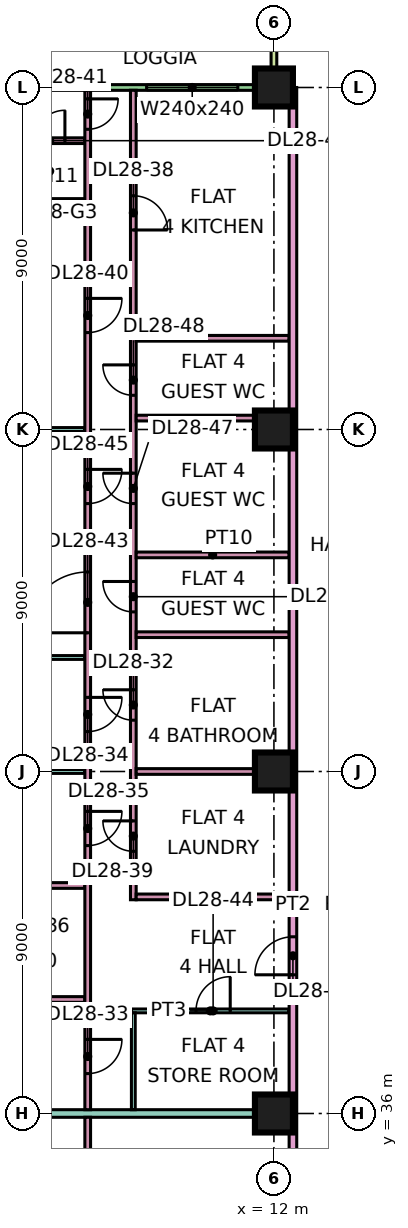
"""IFC4 building model, lengths in metres.
Left out: names, types, materials, properties, quantities, classifications, styles, units other than length and angle.
Written with IfcOpenShell. Run it as: python <this file> out.ifc"""

import sys

from ifc_helpers import new_model, si_unit, direction, frame, frame_2d, origin, origin_2d, place, context, subcontext, project, spatial, rectangle, extrude, element, fill, save


model = new_model("IFC4")
c1 = context("Model", 3, precision=1e-05, world=origin(), true_north=direction((0.0, 1.0)))
c2 = subcontext(c1, "Body", "Model", "MODEL_VIEW")
j1 = project(units=[si_unit("LENGTHUNIT", "METRE"), si_unit("PLANEANGLEUNIT", "RADIAN")], contexts=[c1])
p1 = place(None, origin())
s1 = spatial("IfcSite", under=j1, at=p1, CompositionType="ELEMENT")
p2 = place(p1, origin())
s2 = spatial("IfcBuilding", under=s1, at=p2, CompositionType="ELEMENT")
p3 = place(p2, frame((0.0, 0.0, 121.9)))
s3 = spatial("IfcBuildingStorey", under=s2, at=p3, CompositionType="ELEMENT", Elevation=121.9)
for number, where, z_axis, x_axis in (
    (1, (12.0, 36.0, 0.0), (0.0, 0.0, 1.0), (1.0, 0.0, 0.0)),
    (2, (12.0, 45.0, 0.0), (0.0, 0.0, 1.0), (1.0, 0.0, 0.0)),
    (3, (12.0, 54.0, 0.0), (0.0, 0.0, 1.0), (1.0, 0.0, 0.0)),
    (4, (12.0, 63.0, 0.0), (0.0, 0.0, 1.0), (1.0, 0.0, 0.0)),
):
    element("IfcColumn", number, at=place(p3, frame(where, z_axis=z_axis, x_axis=x_axis)), inside=s3, PredefinedType="COLUMN", context=c2, shape_type="SweptSolid", body=[
        extrude(rectangle(XDim=1.0, YDim=1.0, at=origin_2d()), origin(), (0.0, 0.0, 1.0), 3.75),
    ])
p4 = place(p3, frame((11.925, 63.0, 0.0), z_axis=(0.0, 0.0, 1.0), x_axis=(-1.0, 0.0, 0.0)))
e5 = element("IfcWall", 5, at=p4, inside=s3, PredefinedType="SOLIDWALL", context=c2, shape_type="SweptSolid", body=[
    extrude(rectangle(XDim=10.35, YDim=0.15, at=frame_2d((5.175, 0.0))), origin(), (0.0, 0.0, 1.0), 3.35),
])
p5 = place(p4, frame((0.875, 0.0, 0.45)))
e6 = element("IfcOpeningElement", 6, at=p5, cuts=e5, PredefinedType="OPENING", context=c2, shape_type="SweptSolid", body=[
    extrude(rectangle(XDim=2.4, YDim=2.4, at=frame_2d((1.2, 1.2))), frame((0.0, 0.085, 0.0), z_axis=(0.0, -1.0, 0.0), x_axis=(1.0, 0.0, 0.0)), (0.0, 0.0, 1.0), 0.17),
])
p6 = place(p4, frame((6.688, 0.0, 0.0)))
e7 = element("IfcOpeningElement", 7, at=p6, cuts=e5, PredefinedType="OPENING", context=c2, shape_type="SweptSolid", body=[
    extrude(rectangle(XDim=1.8, YDim=2.4, at=frame_2d((0.9, 1.2))), frame((0.0, 0.085, 0.0), z_axis=(0.0, -1.0, 0.0), x_axis=(1.0, 0.0, 0.0)), (0.0, 0.0, 1.0), 0.17),
])
p7 = place(p3, frame((12.0, 64.5, 0.0), z_axis=(0.0, 0.0, 1.0), x_axis=(0.0, -1.0, 0.0)))
e8 = element("IfcWall", 8, at=p7, inside=s3, PredefinedType="SOLIDWALL", context=c2, shape_type="SweptSolid", body=[
    extrude(rectangle(XDim=1.5, YDim=0.15, at=frame_2d((0.75, 0.0))), origin(), (0.0, 0.0, 1.0), 3.35),
])
p8 = place(p3, frame((-1.351, 39.0, 0.0), z_axis=(0.0, 0.0, 1.0), x_axis=(1.0, 0.0, 0.0)))
e9 = element("IfcWall", 9, at=p8, inside=s3, PredefinedType="PARTITIONING", context=c2, shape_type="SweptSolid", body=[
    extrude(rectangle(XDim=8.376, YDim=0.15, at=frame_2d((4.188, 0.0))), origin(), (0.0, 0.0, 1.0), 3.35),
])
p9 = place(p3, frame((-1.351, 45.0, 0.0), z_axis=(0.0, 0.0, 1.0), x_axis=(1.0, 0.0, 0.0)))
e10 = element("IfcWall", 10, at=p9, inside=s3, PredefinedType="PARTITIONING", context=c2, shape_type="SweptSolid", body=[
    extrude(rectangle(XDim=8.376, YDim=0.1, at=frame_2d((4.188, 0.0))), origin(), (0.0, 0.0, 1.0), 3.35),
])
p10 = place(p3, frame((0.0, 36.0, 0.0), z_axis=(0.0, 0.0, 1.0), x_axis=(1.0, 0.0, 0.0)))
e11 = element("IfcWall", 11, at=p10, inside=s3, PredefinedType="PARTITIONING", context=c2, shape_type="SweptSolid", body=[
    extrude(rectangle(XDim=12.4, YDim=0.2, at=frame_2d((6.2, 0.0))), origin(), (0.0, 0.0, 1.0), 3.35),
])
p11 = place(p3, frame((0.0, 48.0, 0.0), z_axis=(0.0, 0.0, 1.0), x_axis=(1.0, 0.0, 0.0)))
e12 = element("IfcWall", 12, at=p11, inside=s3, PredefinedType="PARTITIONING", context=c2, shape_type="SweptSolid", body=[
    extrude(rectangle(XDim=7.025, YDim=0.1, at=frame_2d((3.512, 0.0))), origin(), (0.0, 0.0, 1.0), 3.35),
])
for number, where, z_axis, x_axis in (
    (13, (0.074, 51.0, 0.0), (0.0, 0.0, 1.0), (1.0, 0.0, 0.0)),
    (14, (0.074, 54.0, 0.0), (0.0, 0.0, 1.0), (1.0, 0.0, 0.0)),
):
    element("IfcWall", number, at=place(p3, frame(where, z_axis=z_axis, x_axis=x_axis)), inside=s3, PredefinedType="PARTITIONING", context=c2, shape_type="SweptSolid", body=[
        extrude(rectangle(XDim=6.951, YDim=0.1, at=frame_2d((3.476, 0.0))), origin(), (0.0, 0.0, 1.0), 3.35),
    ])
p12 = place(p3, frame((0.074, 60.0, 0.0), z_axis=(0.0, 0.0, 1.0), x_axis=(1.0, 0.0, 0.0)))
e15 = element("IfcWall", 15, at=p12, inside=s3, PredefinedType="PARTITIONING", context=c2, shape_type="SweptSolid", body=[
    extrude(rectangle(XDim=6.951, YDim=0.15, at=frame_2d((3.476, 0.0))), origin(), (0.0, 0.0, 1.0), 3.35),
])
p13 = place(p3, frame((4.175, 42.0, 0.0), z_axis=(0.0, 0.0, 1.0), x_axis=(1.0, 0.0, 0.0)))
e16 = element("IfcWall", 16, at=p13, inside=s3, PredefinedType="PARTITIONING", context=c2, shape_type="SweptSolid", body=[
    extrude(rectangle(XDim=2.85, YDim=0.15, at=frame_2d((1.425, 0.0))), origin(), (0.0, 0.0, 1.0), 3.35),
])
p14 = place(p13, frame((0.975, 0.0, 0.0)))
e17 = element("IfcOpeningElement", 17, at=p14, cuts=e16, PredefinedType="OPENING", context=c2, shape_type="SweptSolid", body=[
    extrude(rectangle(XDim=0.8, YDim=2.1, at=frame_2d((0.4, 1.05))), frame((0.0, 0.085, 0.0), z_axis=(0.0, -1.0, 0.0), x_axis=(1.0, 0.0, 0.0)), (0.0, 0.0, 1.0), 0.17),
])
p15 = place(p3, frame((5.025, 61.6, 0.0), z_axis=(0.0, 0.0, 1.0), x_axis=(1.0, 0.0, 0.0)))
e18 = element("IfcWall", 18, at=p15, inside=s3, PredefinedType="PARTITIONING", context=c2, shape_type="SweptSolid", body=[
    extrude(rectangle(XDim=2.0, YDim=0.15, at=frame_2d((1.0, 0.0))), origin(), (0.0, 0.0, 1.0), 3.35),
])
p16 = place(p15, frame((0.675, 0.0, 0.0)))
e19 = element("IfcOpeningElement", 19, at=p16, cuts=e18, PredefinedType="OPENING", context=c2, shape_type="SweptSolid", body=[
    extrude(rectangle(XDim=0.8, YDim=2.1, at=frame_2d((0.4, 1.05))), frame((0.0, 0.085, 0.0), z_axis=(0.0, -1.0, 0.0), x_axis=(1.0, 0.0, 0.0)), (0.0, 0.0, 1.0), 0.17),
])
p17 = place(p3, frame((7.1, 27.525, 0.0), z_axis=(0.0, 0.0, 1.0), x_axis=(0.0, 1.0, 0.0)))
e20 = element("IfcWall", 20, at=p17, inside=s3, PredefinedType="PARTITIONING", context=c2, shape_type="SweptSolid", body=[
    extrude(rectangle(XDim=8.375, YDim=0.15, at=frame_2d((4.188, 0.0))), origin(), (0.0, 0.0, 1.0), 3.35),
])
p18 = place(p17, frame((0.675, 0.0, 0.0)))
e21 = element("IfcOpeningElement", 21, at=p18, cuts=e20, PredefinedType="OPENING", context=c2, shape_type="SweptSolid", body=[
    extrude(rectangle(XDim=0.8, YDim=2.1, at=frame_2d((0.4, 1.05))), frame((0.0, 0.085, 0.0), z_axis=(0.0, -1.0, 0.0), x_axis=(1.0, 0.0, 0.0)), (0.0, 0.0, 1.0), 0.17),
])
p19 = place(p17, frame((4.875, 0.0, 0.0)))
e22 = element("IfcOpeningElement", 22, at=p19, cuts=e20, PredefinedType="OPENING", context=c2, shape_type="SweptSolid", body=[
    extrude(rectangle(XDim=0.9, YDim=2.1, at=frame_2d((0.45, 1.05))), frame((0.0, 0.085, 0.0), z_axis=(0.0, -1.0, 0.0), x_axis=(1.0, 0.0, 0.0)), (0.0, 0.0, 1.0), 0.17),
])
p20 = place(p3, frame((7.1, 36.1, 0.0), z_axis=(0.0, 0.0, 1.0), x_axis=(0.0, 1.0, 0.0)))
e23 = element("IfcWall", 23, at=p20, inside=s3, PredefinedType="PARTITIONING", context=c2, shape_type="SweptSolid", body=[
    extrude(rectangle(XDim=26.826, YDim=0.15, at=frame_2d((13.413, 0.0))), origin(), (0.0, 0.0, 1.0), 3.35),
])
p21 = place(p20, frame((0.95, 0.0, 0.0)))
e24 = element("IfcOpeningElement", 24, at=p21, cuts=e23, PredefinedType="OPENING", context=c2, shape_type="SweptSolid", body=[
    extrude(rectangle(XDim=0.9, YDim=2.1, at=frame_2d((0.45, 1.05))), frame((0.0, 0.085, 0.0), z_axis=(0.0, -1.0, 0.0), x_axis=(1.0, 0.0, 0.0)), (0.0, 0.0, 1.0), 0.17),
])
p22 = place(p20, frame((9.95, 0.0, 0.0)))
e25 = element("IfcOpeningElement", 25, at=p22, cuts=e23, PredefinedType="OPENING", context=c2, shape_type="SweptSolid", body=[
    extrude(rectangle(XDim=0.9, YDim=2.1, at=frame_2d((0.45, 1.05))), frame((0.0, 0.085, 0.0), z_axis=(0.0, -1.0, 0.0), x_axis=(1.0, 0.0, 0.0)), (0.0, 0.0, 1.0), 0.17),
])
p23 = place(p20, frame((6.95, 0.0, 0.0)))
e26 = element("IfcOpeningElement", 26, at=p23, cuts=e23, PredefinedType="OPENING", context=c2, shape_type="SweptSolid", body=[
    extrude(rectangle(XDim=0.9, YDim=2.1, at=frame_2d((0.45, 1.05))), frame((0.0, 0.085, 0.0), z_axis=(0.0, -1.0, 0.0), x_axis=(1.0, 0.0, 0.0)), (0.0, 0.0, 1.0), 0.17),
])
p24 = place(p20, frame((20.45, 0.0, 0.0)))
e27 = element("IfcOpeningElement", 27, at=p24, cuts=e23, PredefinedType="OPENING", context=c2, shape_type="SweptSolid", body=[
    extrude(rectangle(XDim=0.9, YDim=2.1, at=frame_2d((0.45, 1.05))), frame((0.0, 0.085, 0.0), z_axis=(0.0, -1.0, 0.0), x_axis=(1.0, 0.0, 0.0)), (0.0, 0.0, 1.0), 0.17),
])
p25 = place(p20, frame((25.8, 0.0, 0.0)))
e28 = element("IfcOpeningElement", 28, at=p25, cuts=e23, PredefinedType="OPENING", context=c2, shape_type="SweptSolid", body=[
    extrude(rectangle(XDim=0.8, YDim=2.1, at=frame_2d((0.4, 1.05))), frame((0.0, 0.085, 0.0), z_axis=(0.0, -1.0, 0.0), x_axis=(1.0, 0.0, 0.0)), (0.0, 0.0, 1.0), 0.17),
])
p26 = place(p20, frame((12.55, 0.0, 0.0)))
e29 = element("IfcOpeningElement", 29, at=p26, cuts=e23, PredefinedType="OPENING", context=c2, shape_type="SweptSolid", body=[
    extrude(rectangle(XDim=1.6, YDim=2.1, at=frame_2d((0.8, 1.05))), frame((0.0, 0.085, 0.0), z_axis=(0.0, -1.0, 0.0), x_axis=(1.0, 0.0, 0.0)), (0.0, 0.0, 1.0), 0.17),
])
p27 = place(p20, frame((15.95, 0.0, 0.0)))
e30 = element("IfcOpeningElement", 30, at=p27, cuts=e23, PredefinedType="OPENING", context=c2, shape_type="SweptSolid", body=[
    extrude(rectangle(XDim=0.9, YDim=2.1, at=frame_2d((0.45, 1.05))), frame((0.0, 0.085, 0.0), z_axis=(0.0, -1.0, 0.0), x_axis=(1.0, 0.0, 0.0)), (0.0, 0.0, 1.0), 0.17),
])
p28 = place(p3, frame((8.25, 38.7, 0.0), z_axis=(0.0, 0.0, 1.0), x_axis=(1.0, 0.0, 0.0)))
e31 = element("IfcWall", 31, at=p28, inside=s3, PredefinedType="PARTITIONING", context=c2, shape_type="SweptSolid", body=[
    extrude(rectangle(XDim=4.15, YDim=0.1, at=frame_2d((2.075, 0.0))), origin(), (0.0, 0.0, 1.0), 3.35),
])
p29 = place(p28, frame((1.7, 0.0, 0.0)))
e32 = element("IfcOpeningElement", 32, at=p29, cuts=e31, PredefinedType="OPENING", context=c2, shape_type="SweptSolid", body=[
    extrude(rectangle(XDim=0.9, YDim=2.1, at=frame_2d((0.45, 1.05))), frame((0.0, 0.06, 0.0), z_axis=(0.0, -1.0, 0.0), x_axis=(1.0, 0.0, 0.0)), (0.0, 0.0, 1.0), 0.12),
])
p30 = place(p3, frame((8.3, 36.1, 0.0), z_axis=(0.0, 0.0, 1.0), x_axis=(0.0, 1.0, 0.0)))
e33 = element("IfcWall", 33, at=p30, inside=s3, PredefinedType="PARTITIONING", context=c2, shape_type="SweptSolid", body=[
    extrude(rectangle(XDim=2.55, YDim=0.1, at=frame_2d((1.275, 0.0))), origin(), (0.0, 0.0, 1.0), 3.35),
])
p31 = place(p3, frame((8.3, 41.625, 0.0), z_axis=(0.0, 0.0, 1.0), x_axis=(0.0, 1.0, 0.0)))
e34 = element("IfcWall", 34, at=p31, inside=s3, PredefinedType="PARTITIONING", context=c2, shape_type="SweptSolid", body=[
    extrude(rectangle(XDim=21.301, YDim=0.15, at=frame_2d((10.65, 0.0))), origin(), (0.0, 0.0, 1.0), 3.35),
])
p32 = place(p31, frame((4.725, 0.0, 0.0)))
e35 = element("IfcOpeningElement", 35, at=p32, cuts=e34, PredefinedType="OPENING", context=c2, shape_type="SweptSolid", body=[
    extrude(rectangle(XDim=0.8, YDim=2.1, at=frame_2d((0.4, 1.05))), frame((0.0, 0.085, 0.0), z_axis=(0.0, -1.0, 0.0), x_axis=(1.0, 0.0, 0.0)), (0.0, 0.0, 1.0), 0.17),
])
p33 = place(p31, frame((17.625, 0.0, 0.0)))
e36 = element("IfcOpeningElement", 36, at=p33, cuts=e34, PredefinedType="OPENING", context=c2, shape_type="SweptSolid", body=[
    extrude(rectangle(XDim=0.9, YDim=2.1, at=frame_2d((0.45, 1.05))), frame((0.0, 0.085, 0.0), z_axis=(0.0, -1.0, 0.0), x_axis=(1.0, 0.0, 0.0)), (0.0, 0.0, 1.0), 0.17),
])
p34 = place(p31, frame((1.275, 0.0, 0.0)))
e37 = element("IfcOpeningElement", 37, at=p34, cuts=e34, PredefinedType="OPENING", context=c2, shape_type="SweptSolid", body=[
    extrude(rectangle(XDim=0.8, YDim=2.1, at=frame_2d((0.4, 1.05))), frame((0.0, 0.085, 0.0), z_axis=(0.0, -1.0, 0.0), x_axis=(1.0, 0.0, 0.0)), (0.0, 0.0, 1.0), 0.17),
])
p35 = place(p31, frame((7.575, 0.0, 0.0)))
e38 = element("IfcOpeningElement", 38, at=p35, cuts=e34, PredefinedType="OPENING", context=c2, shape_type="SweptSolid", body=[
    extrude(rectangle(XDim=0.8, YDim=2.1, at=frame_2d((0.4, 1.05))), frame((0.0, 0.085, 0.0), z_axis=(0.0, -1.0, 0.0), x_axis=(1.0, 0.0, 0.0)), (0.0, 0.0, 1.0), 0.17),
])
p36 = place(p31, frame((10.425, 0.0, 0.0)))
e39 = element("IfcOpeningElement", 39, at=p36, cuts=e34, PredefinedType="OPENING", context=c2, shape_type="SweptSolid", body=[
    extrude(rectangle(XDim=0.8, YDim=2.1, at=frame_2d((0.4, 1.05))), frame((0.0, 0.085, 0.0), z_axis=(0.0, -1.0, 0.0), x_axis=(1.0, 0.0, 0.0)), (0.0, 0.0, 1.0), 0.17),
])
p37 = place(p31, frame((13.275, 0.0, 0.0)))
e40 = element("IfcOpeningElement", 40, at=p37, cuts=e34, PredefinedType="OPENING", context=c2, shape_type="SweptSolid", body=[
    extrude(rectangle(XDim=0.8, YDim=2.1, at=frame_2d((0.4, 1.05))), frame((0.0, 0.085, 0.0), z_axis=(0.0, -1.0, 0.0), x_axis=(1.0, 0.0, 0.0)), (0.0, 0.0, 1.0), 0.17),
])
for number, where, z_axis, x_axis in (
    (41, (8.375, 41.7, 0.0), (0.0, 0.0, 1.0), (1.0, 0.0, 0.0)),
    (42, (8.375, 45.0, 0.0), (0.0, 0.0, 1.0), (1.0, 0.0, 0.0)),
    (43, (8.375, 48.6, 0.0), (0.0, 0.0, 1.0), (1.0, 0.0, 0.0)),
    (44, (8.375, 50.7, 0.0), (0.0, 0.0, 1.0), (1.0, 0.0, 0.0)),
    (45, (8.375, 54.3, 0.0), (0.0, 0.0, 1.0), (1.0, 0.0, 0.0)),
    (46, (8.375, 56.4, 0.0), (0.0, 0.0, 1.0), (1.0, 0.0, 0.0)),
):
    element("IfcWall", number, at=place(p3, frame(where, z_axis=z_axis, x_axis=x_axis)), inside=s3, PredefinedType="PARTITIONING", context=c2, shape_type="SweptSolid", body=[
        extrude(rectangle(XDim=4.025, YDim=0.15, at=frame_2d((2.012, 0.0))), origin(), (0.0, 0.0, 1.0), 3.35),
    ])
p38 = place(p3, frame((12.5, 20.0, 0.0), z_axis=(0.0, 0.0, 1.0), x_axis=(0.0, 1.0, 0.0)))
e47 = element("IfcWall", 47, at=p38, inside=s3, PredefinedType="PARTITIONING", context=c2, shape_type="SweptSolid", body=[
    extrude(rectangle(XDim=43.0, YDim=0.2, at=frame_2d((21.5, 0.0))), origin(), (0.0, 0.0, 1.0), 3.35),
])
p39 = place(p38, frame((19.65, 0.0, 0.0)))
e48 = element("IfcOpeningElement", 48, at=p39, cuts=e47, PredefinedType="OPENING", context=c2, shape_type="SweptSolid", body=[
    extrude(rectangle(XDim=1.0, YDim=2.1, at=frame_2d((0.5, 1.05))), frame((0.0, 0.11, 0.0), z_axis=(0.0, -1.0, 0.0), x_axis=(1.0, 0.0, 0.0)), (0.0, 0.0, 1.0), 0.22),
])
p40 = place(p38, frame((0.6, 0.0, 0.0)))
e49 = element("IfcOpeningElement", 49, at=p40, cuts=e47, PredefinedType="OPENING", context=c2, shape_type="SweptSolid", body=[
    extrude(rectangle(XDim=1.2, YDim=2.1, at=frame_2d((0.6, 1.05))), frame((0.0, 0.11, 0.0), z_axis=(0.0, -1.0, 0.0), x_axis=(1.0, 0.0, 0.0)), (0.0, 0.0, 1.0), 0.22),
])
p41 = place(p38, frame((4.5, 0.0, 0.0)))
e50 = element("IfcOpeningElement", 50, at=p41, cuts=e47, PredefinedType="OPENING", context=c2, shape_type="SweptSolid", body=[
    extrude(rectangle(XDim=1.0, YDim=2.1, at=frame_2d((0.5, 1.05))), frame((0.0, 0.11, 0.0), z_axis=(0.0, -1.0, 0.0), x_axis=(1.0, 0.0, 0.0)), (0.0, 0.0, 1.0), 0.22),
])
p42 = place(p5, origin())
e51 = element("IfcWindow", 51, at=p42, inside=s3, PartitioningType="SINGLE_PANEL", PredefinedType="WINDOW", context=c2, shape_type="SweptSolid", body=[
    extrude(rectangle(XDim=2.4, YDim=2.4, at=frame_2d((1.2, 1.2))), frame((0.0, 0.03, 0.0), z_axis=(0.0, -1.0, 0.0), x_axis=(1.0, 0.0, 0.0)), (0.0, 0.0, 1.0), 0.06),
])
fill(e6, e51)
p43 = place(p32, frame((0.8, 0.0, 0.0), z_axis=(0.0, 0.0, 1.0), x_axis=(-1.0, 0.0, 0.0)))
e52 = element("IfcDoor", 52, at=p43, inside=s3, OperationType="SINGLE_SWING_RIGHT", PredefinedType="DOOR", context=c2, shape_type="SweptSolid", body=[
    extrude(rectangle(XDim=0.8, YDim=2.1, at=frame_2d((0.4, 1.05))), frame((0.0, 0.025, 0.0), z_axis=(0.0, -1.0, 0.0), x_axis=(1.0, 0.0, 0.0)), (0.0, 0.0, 1.0), 0.05),
])
fill(e35, e52)
p44 = place(p21, origin())
e53 = element("IfcDoor", 53, at=p44, inside=s3, OperationType="SINGLE_SWING_RIGHT", PredefinedType="DOOR", context=c2, shape_type="SweptSolid", body=[
    extrude(rectangle(XDim=0.9, YDim=2.1, at=frame_2d((0.45, 1.05))), frame((0.0, 0.025, 0.0), z_axis=(0.0, -1.0, 0.0), x_axis=(1.0, 0.0, 0.0)), (0.0, 0.0, 1.0), 0.05),
])
fill(e24, e53)
p45 = place(p22, origin())
e54 = element("IfcDoor", 54, at=p45, inside=s3, OperationType="SINGLE_SWING_RIGHT", PredefinedType="DOOR", context=c2, shape_type="SweptSolid", body=[
    extrude(rectangle(XDim=0.9, YDim=2.1, at=frame_2d((0.45, 1.05))), frame((0.0, 0.025, 0.0), z_axis=(0.0, -1.0, 0.0), x_axis=(1.0, 0.0, 0.0)), (0.0, 0.0, 1.0), 0.05),
])
fill(e25, e54)
p46 = place(p23, origin())
e55 = element("IfcDoor", 55, at=p46, inside=s3, OperationType="SINGLE_SWING_RIGHT", PredefinedType="DOOR", context=c2, shape_type="SweptSolid", body=[
    extrude(rectangle(XDim=0.9, YDim=2.1, at=frame_2d((0.45, 1.05))), frame((0.0, 0.025, 0.0), z_axis=(0.0, -1.0, 0.0), x_axis=(1.0, 0.0, 0.0)), (0.0, 0.0, 1.0), 0.05),
])
fill(e26, e55)
p47 = place(p39, origin())
e56 = element("IfcDoor", 56, at=p47, inside=s3, OperationType="SINGLE_SWING_LEFT", PredefinedType="DOOR", context=c2, shape_type="SweptSolid", body=[
    extrude(rectangle(XDim=1.0, YDim=2.1, at=frame_2d((0.5, 1.05))), frame((0.0, 0.025, 0.0), z_axis=(0.0, -1.0, 0.0), x_axis=(1.0, 0.0, 0.0)), (0.0, 0.0, 1.0), 0.05),
])
fill(e48, e56)
p48 = place(p33, frame((0.9, 0.0, 0.0), z_axis=(0.0, 0.0, 1.0), x_axis=(-1.0, 0.0, 0.0)))
e57 = element("IfcDoor", 57, at=p48, inside=s3, OperationType="SINGLE_SWING_LEFT", PredefinedType="DOOR", context=c2, shape_type="SweptSolid", body=[
    extrude(rectangle(XDim=0.9, YDim=2.1, at=frame_2d((0.45, 1.05))), frame((0.0, 0.025, 0.0), z_axis=(0.0, -1.0, 0.0), x_axis=(1.0, 0.0, 0.0)), (0.0, 0.0, 1.0), 0.05),
])
fill(e36, e57)
p49 = place(p34, frame((0.8, 0.0, 0.0), z_axis=(0.0, 0.0, 1.0), x_axis=(-1.0, 0.0, 0.0)))
e58 = element("IfcDoor", 58, at=p49, inside=s3, OperationType="SINGLE_SWING_RIGHT", PredefinedType="DOOR", context=c2, shape_type="SweptSolid", body=[
    extrude(rectangle(XDim=0.8, YDim=2.1, at=frame_2d((0.4, 1.05))), frame((0.0, 0.025, 0.0), z_axis=(0.0, -1.0, 0.0), x_axis=(1.0, 0.0, 0.0)), (0.0, 0.0, 1.0), 0.05),
])
fill(e37, e58)
p50 = place(p24, origin())
e59 = element("IfcDoor", 59, at=p50, inside=s3, OperationType="SINGLE_SWING_RIGHT", PredefinedType="DOOR", context=c2, shape_type="SweptSolid", body=[
    extrude(rectangle(XDim=0.9, YDim=2.1, at=frame_2d((0.45, 1.05))), frame((0.0, 0.025, 0.0), z_axis=(0.0, -1.0, 0.0), x_axis=(1.0, 0.0, 0.0)), (0.0, 0.0, 1.0), 0.05),
])
fill(e27, e59)
p51 = place(p25, origin())
e60 = element("IfcDoor", 60, at=p51, inside=s3, OperationType="SINGLE_SWING_RIGHT", PredefinedType="DOOR", context=c2, shape_type="SweptSolid", body=[
    extrude(rectangle(XDim=0.8, YDim=2.1, at=frame_2d((0.4, 1.05))), frame((0.0, 0.025, 0.0), z_axis=(0.0, -1.0, 0.0), x_axis=(1.0, 0.0, 0.0)), (0.0, 0.0, 1.0), 0.05),
])
fill(e28, e60)
p52 = place(p16, frame((0.8, 0.0, 0.0), z_axis=(0.0, 0.0, 1.0), x_axis=(-1.0, 0.0, 0.0)))
e61 = element("IfcDoor", 61, at=p52, inside=s3, OperationType="SINGLE_SWING_RIGHT", PredefinedType="DOOR", context=c2, shape_type="SweptSolid", body=[
    extrude(rectangle(XDim=0.8, YDim=2.1, at=frame_2d((0.4, 1.05))), frame((0.0, 0.025, 0.0), z_axis=(0.0, -1.0, 0.0), x_axis=(1.0, 0.0, 0.0)), (0.0, 0.0, 1.0), 0.05),
])
fill(e19, e61)
p53 = place(p26, origin())
e62 = element("IfcDoor", 62, at=p53, inside=s3, OperationType="DOUBLE_DOOR_SINGLE_SWING", PredefinedType="DOOR", context=c2, shape_type="SweptSolid", body=[
    extrude(rectangle(XDim=1.6, YDim=2.1, at=frame_2d((0.8, 1.05))), frame((0.0, 0.025, 0.0), z_axis=(0.0, -1.0, 0.0), x_axis=(1.0, 0.0, 0.0)), (0.0, 0.0, 1.0), 0.05),
])
fill(e29, e62)
p54 = place(p29, frame((0.9, 0.0, 0.0), z_axis=(0.0, 0.0, 1.0), x_axis=(-1.0, 0.0, 0.0)))
e63 = element("IfcDoor", 63, at=p54, inside=s3, OperationType="SINGLE_SWING_RIGHT", PredefinedType="DOOR", context=c2, shape_type="SweptSolid", body=[
    extrude(rectangle(XDim=0.9, YDim=2.1, at=frame_2d((0.45, 1.05))), frame((0.0, 0.025, 0.0), z_axis=(0.0, -1.0, 0.0), x_axis=(1.0, 0.0, 0.0)), (0.0, 0.0, 1.0), 0.05),
])
fill(e32, e63)
p55 = place(p27, origin())
e64 = element("IfcDoor", 64, at=p55, inside=s3, OperationType="SINGLE_SWING_RIGHT", PredefinedType="DOOR", context=c2, shape_type="SweptSolid", body=[
    extrude(rectangle(XDim=0.9, YDim=2.1, at=frame_2d((0.45, 1.05))), frame((0.0, 0.025, 0.0), z_axis=(0.0, -1.0, 0.0), x_axis=(1.0, 0.0, 0.0)), (0.0, 0.0, 1.0), 0.05),
])
fill(e30, e64)
p56 = place(p35, frame((0.8, 0.0, 0.0), z_axis=(0.0, 0.0, 1.0), x_axis=(-1.0, 0.0, 0.0)))
e65 = element("IfcDoor", 65, at=p56, inside=s3, OperationType="SINGLE_SWING_RIGHT", PredefinedType="DOOR", context=c2, shape_type="SweptSolid", body=[
    extrude(rectangle(XDim=0.8, YDim=2.1, at=frame_2d((0.4, 1.05))), frame((0.0, 0.025, 0.0), z_axis=(0.0, -1.0, 0.0), x_axis=(1.0, 0.0, 0.0)), (0.0, 0.0, 1.0), 0.05),
])
fill(e38, e65)
p57 = place(p36, frame((0.8, 0.0, 0.0), z_axis=(0.0, 0.0, 1.0), x_axis=(-1.0, 0.0, 0.0)))
e66 = element("IfcDoor", 66, at=p57, inside=s3, OperationType="SINGLE_SWING_RIGHT", PredefinedType="DOOR", context=c2, shape_type="SweptSolid", body=[
    extrude(rectangle(XDim=0.8, YDim=2.1, at=frame_2d((0.4, 1.05))), frame((0.0, 0.025, 0.0), z_axis=(0.0, -1.0, 0.0), x_axis=(1.0, 0.0, 0.0)), (0.0, 0.0, 1.0), 0.05),
])
fill(e39, e66)
p58 = place(p37, frame((0.8, 0.0, 0.0), z_axis=(0.0, 0.0, 1.0), x_axis=(-1.0, 0.0, 0.0)))
e67 = element("IfcDoor", 67, at=p58, inside=s3, OperationType="SINGLE_SWING_RIGHT", PredefinedType="DOOR", context=c2, shape_type="SweptSolid", body=[
    extrude(rectangle(XDim=0.8, YDim=2.1, at=frame_2d((0.4, 1.05))), frame((0.0, 0.025, 0.0), z_axis=(0.0, -1.0, 0.0), x_axis=(1.0, 0.0, 0.0)), (0.0, 0.0, 1.0), 0.05),
])
fill(e40, e67)
save(model, sys.argv[1])
